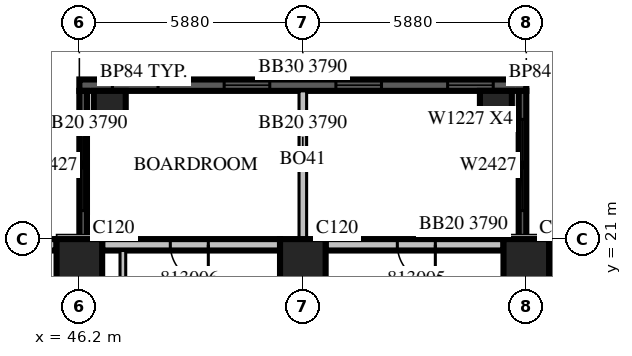
"""IFC4 building model, lengths in metres.
Left out: names, types, materials, properties, quantities, classifications, styles, units other than length and angle.
Written with IfcOpenShell. Run it as: python <this file> out.ifc"""

import sys

from ifc_helpers import new_model, si_unit, direction, frame, frame_2d, origin, origin_2d, place, context, subcontext, project, spatial, rectangle, extrude, source, transform, mapped, element, fill, save


model = new_model("IFC4")
c1 = context("Model", 3, precision=1e-05, world=origin(), true_north=direction((0.0, 1.0)))
c2 = subcontext(c1, "Body", "Model", "MODEL_VIEW")
j1 = project(units=[si_unit("LENGTHUNIT", "METRE"), si_unit("PLANEANGLEUNIT", "RADIAN")], contexts=[c1])
p1 = place(None, origin())
s1 = spatial("IfcSite", under=j1, at=p1, CompositionType="ELEMENT")
p2 = place(p1, origin())
s2 = spatial("IfcBuilding", under=s1, at=p2, CompositionType="ELEMENT")
p3 = place(p2, frame((0.0, 0.0, 65.7)))
s3 = spatial("IfcBuildingStorey", under=s2, at=p3, CompositionType="ELEMENT", Elevation=65.7)
m1 = source(origin(), c2, "Body", "SweptSolid", [
    extrude(rectangle(XDim=1.2, YDim=1.2, at=origin_2d()), origin(), (0.0, 0.0, 1.0), 4.2),
])
for number, where, z_axis, x_axis in (
    (1, (46.2, 20.4, 0.0), (0.0, 0.0, 1.0), (1.0, 0.0, 0.0)),
    (2, (52.08, 20.4, 0.0), (0.0, 0.0, 1.0), (1.0, 0.0, 0.0)),
    (3, (57.96, 20.4, 0.0), (0.0, 0.0, 1.0), (1.0, 0.0, 0.0)),
):
    element("IfcColumn", number, at=place(p3, frame(where, z_axis=z_axis, x_axis=x_axis)), inside=s3, PredefinedType="COLUMN", context=c2, shape_type="MappedRepresentation", body=[
        mapped(m1, transform((0.0, 0.0, 0.0), scale=1.0)),
    ])
m2 = source(origin(), c2, "Body", "SweptSolid", [
    extrude(rectangle(XDim=0.84, YDim=0.84, at=origin_2d()), origin(), (0.0, 0.0, 1.0), 4.2),
])
for number, where, z_axis, x_axis in (
    (4, (47.0, 24.48, 0.0), (0.0, 0.0, 1.0), (1.0, 0.0, 0.0)),
    (5, (57.16, 24.48, 0.0), (0.0, 0.0, 1.0), (1.0, 0.0, 0.0)),
):
    element("IfcColumn", number, at=place(p3, frame(where, z_axis=z_axis, x_axis=x_axis)), inside=s3, PredefinedType="COLUMN", context=c2, shape_type="MappedRepresentation", body=[
        mapped(m2, transform((0.0, 0.0, 0.0), scale=1.0)),
    ])
m3 = source(origin(), c2, "Body", "SweptSolid", [
    extrude(rectangle(XDim=11.76, YDim=0.3, at=frame_2d((5.88, 0.0))), origin(), (0.0, 0.0, 1.0), 3.79),
])
p4 = place(p3, frame((57.96, 25.05, 0.0), z_axis=(0.0, 0.0, 1.0), x_axis=(-1.0, 0.0, 0.0)))
e6 = element("IfcWall", 6, at=p4, inside=s3, PredefinedType="SOLIDWALL", context=c2, shape_type="MappedRepresentation", body=[
    mapped(m3, transform((0.0, 0.0, 0.0), scale=1.0)),
])
m4 = source(origin(), c2, "Body", "SweptSolid", [
    extrude(rectangle(XDim=1.2, YDim=2.7, at=frame_2d((0.6, 1.35))), frame((0.0, 0.16, 0.0), z_axis=(0.0, -1.0, 0.0), x_axis=(1.0, 0.0, 0.0)), (0.0, 0.0, 1.0), 0.32),
])
p5 = place(p4, frame((0.87, 0.0, 0.6)))
e7 = element("IfcOpeningElement", 7, at=p5, cuts=e6, PredefinedType="OPENING", context=c2, shape_type="MappedRepresentation", body=[
    mapped(m4, transform((0.0, 0.0, 0.0), scale=1.0)),
])
p6 = place(p4, frame((3.81, 0.0, 0.6)))
e8 = element("IfcOpeningElement", 8, at=p6, cuts=e6, PredefinedType="OPENING", context=c2, shape_type="MappedRepresentation", body=[
    mapped(m4, transform((0.0, 0.0, 0.0), scale=1.0)),
])
p7 = place(p4, frame((6.75, 0.0, 0.6)))
e9 = element("IfcOpeningElement", 9, at=p7, cuts=e6, PredefinedType="OPENING", context=c2, shape_type="MappedRepresentation", body=[
    mapped(m4, transform((0.0, 0.0, 0.0), scale=1.0)),
])
p8 = place(p4, frame((9.69, 0.0, 0.6)))
e10 = element("IfcOpeningElement", 10, at=p8, cuts=e6, PredefinedType="OPENING", context=c2, shape_type="MappedRepresentation", body=[
    mapped(m4, transform((0.0, 0.0, 0.0), scale=1.0)),
])
m5 = source(origin(), c2, "Body", "SweptSolid", [
    extrude(rectangle(XDim=3.9, YDim=0.2, at=frame_2d((1.95, 0.0))), origin(), (0.0, 0.0, 1.0), 3.79),
])
p9 = place(p3, frame((52.08, 21.0, 0.0), z_axis=(0.0, 0.0, 1.0), x_axis=(0.0, 1.0, 0.0)))
e11 = element("IfcWall", 11, at=p9, inside=s3, PredefinedType="SOLIDWALL", context=c2, shape_type="MappedRepresentation", body=[
    mapped(m5, transform((0.0, 0.0, 0.0), scale=1.0)),
])
m6 = source(origin(), c2, "Body", "SweptSolid", [
    extrude(rectangle(XDim=3.9, YDim=0.2, at=frame_2d((1.95, 0.0))), origin(), (0.0, 0.0, 1.0), 3.79),
])
p10 = place(p3, frame((57.86, 21.0, 0.0), z_axis=(0.0, 0.0, 1.0), x_axis=(0.0, 1.0, 0.0)))
e12 = element("IfcWall", 12, at=p10, inside=s3, PredefinedType="SOLIDWALL", context=c2, shape_type="MappedRepresentation", body=[
    mapped(m6, transform((0.0, 0.0, 0.0), scale=1.0)),
])
m7 = source(origin(), c2, "Body", "SweptSolid", [
    extrude(rectangle(XDim=2.4, YDim=2.7, at=frame_2d((1.2, 1.35))), frame((0.0, 0.11, 0.0), z_axis=(0.0, -1.0, 0.0), x_axis=(1.0, 0.0, 0.0)), (0.0, 0.0, 1.0), 0.22),
])
p11 = place(p10, frame((0.75, 0.0, 0.6)))
e13 = element("IfcOpeningElement", 13, at=p11, cuts=e12, PredefinedType="OPENING", context=c2, shape_type="MappedRepresentation", body=[
    mapped(m7, transform((0.0, 0.0, 0.0), scale=1.0)),
])
p12 = place(p3, frame((46.3, 21.0, 0.0), z_axis=(0.0, 0.0, 1.0), x_axis=(0.0, 1.0, 0.0)))
e14 = element("IfcWall", 14, at=p12, inside=s3, PredefinedType="SOLIDWALL", context=c2, shape_type="MappedRepresentation", body=[
    mapped(m6, transform((0.0, 0.0, 0.0), scale=1.0)),
])
p13 = place(p12, frame((0.75, 0.0, 0.6)))
e15 = element("IfcOpeningElement", 15, at=p13, cuts=e14, PredefinedType="OPENING", context=c2, shape_type="MappedRepresentation", body=[
    mapped(m7, transform((0.0, 0.0, 0.0), scale=1.0)),
])
m8 = source(origin(), c2, "Body", "SweptSolid", [
    extrude(rectangle(XDim=0.24, YDim=0.3, at=frame_2d((0.12, 0.0))), origin(), (0.0, 0.0, 1.0), 3.8),
])
p14 = place(p3, frame((58.8, 20.85, 0.0), z_axis=(0.0, 0.0, 1.0), x_axis=(-1.0, 0.0, 0.0)))
e16 = element("IfcWall", 16, at=p14, inside=s3, PredefinedType="STANDARD", context=c2, shape_type="MappedRepresentation", body=[
    mapped(m8, transform((0.0, 0.0, 0.0), scale=1.0)),
])
m9 = source(origin(), c2, "Body", "SweptSolid", [
    extrude(rectangle(XDim=4.68, YDim=0.3, at=frame_2d((2.34, 0.0))), origin(), (0.0, 0.0, 1.0), 3.8),
])
p15 = place(p3, frame((57.36, 20.85, 0.0), z_axis=(0.0, 0.0, 1.0), x_axis=(-1.0, 0.0, 0.0)))
e17 = element("IfcWall", 17, at=p15, inside=s3, PredefinedType="STANDARD", context=c2, shape_type="MappedRepresentation", body=[
    mapped(m9, transform((0.0, 0.0, 0.0), scale=1.0)),
])
m10 = source(origin(), c2, "Body", "SweptSolid", [
    extrude(rectangle(XDim=1.0, YDim=2.1, at=frame_2d((0.5, 1.05))), frame((0.0, 0.16, 0.0), z_axis=(0.0, -1.0, 0.0), x_axis=(1.0, 0.0, 0.0)), (0.0, 0.0, 1.0), 0.32),
])
p16 = place(p15, frame((1.793, 0.0, 0.0)))
e18 = element("IfcOpeningElement", 18, at=p16, cuts=e17, PredefinedType="OPENING", context=c2, shape_type="MappedRepresentation", body=[
    mapped(m10, transform((0.0, 0.0, 0.0), scale=1.0)),
])
p17 = place(p3, frame((51.48, 20.85, 0.0), z_axis=(0.0, 0.0, 1.0), x_axis=(-1.0, 0.0, 0.0)))
e19 = element("IfcWall", 19, at=p17, inside=s3, PredefinedType="STANDARD", context=c2, shape_type="MappedRepresentation", body=[
    mapped(m9, transform((0.0, 0.0, 0.0), scale=1.0)),
])
p18 = place(p17, frame((1.887, 0.0, 0.0)))
e20 = element("IfcOpeningElement", 20, at=p18, cuts=e19, PredefinedType="OPENING", context=c2, shape_type="MappedRepresentation", body=[
    mapped(m10, transform((0.0, 0.0, 0.0), scale=1.0)),
])
m11 = source(origin(), c2, "Body", "SweptSolid", [
    extrude(rectangle(XDim=7.2, YDim=0.3, at=frame_2d((3.6, 0.0))), origin(), (0.0, 0.0, 1.0), 3.8),
])
p19 = place(p3, frame((45.6, 20.85, 0.0), z_axis=(0.0, 0.0, 1.0), x_axis=(-1.0, 0.0, 0.0)))
e21 = element("IfcWall", 21, at=p19, inside=s3, PredefinedType="STANDARD", context=c2, shape_type="MappedRepresentation", body=[
    mapped(m11, transform((0.0, 0.0, 0.0), scale=1.0)),
])
m12 = source(origin(), c2, "Body", "SweptSolid", [
    extrude(rectangle(XDim=2.4, YDim=2.7, at=frame_2d((1.2, 1.35))), frame((0.0, 0.16, 0.0), z_axis=(0.0, -1.0, 0.0), x_axis=(1.0, 0.0, 0.0)), (0.0, 0.0, 1.0), 0.32),
])
p20 = place(p19, frame((0.3, 0.0, 0.6)))
e22 = element("IfcOpeningElement", 22, at=p20, cuts=e21, PredefinedType="OPENING", context=c2, shape_type="MappedRepresentation", body=[
    mapped(m12, transform((0.0, 0.0, 0.0), scale=1.0)),
])
m13 = source(origin(), c2, "Body", "SweptSolid", [
    extrude(rectangle(XDim=3.6, YDim=0.15, at=frame_2d((1.8, 0.0))), origin(), (0.0, 0.0, 1.0), 3.8),
])
p21 = place(p3, frame((47.345, 20.7, 0.0), z_axis=(0.0, 0.0, 1.0), x_axis=(0.0, -1.0, 0.0)))
e23 = element("IfcWall", 23, at=p21, inside=s3, PredefinedType="PARTITIONING", context=c2, shape_type="MappedRepresentation", body=[
    mapped(m13, transform((0.0, 0.0, 0.0), scale=1.0)),
])
m14 = source(origin(), c2, "Body", "SweptSolid", [
    extrude(rectangle(XDim=1.2, YDim=2.7, at=frame_2d((0.6, 1.35))), frame((0.0, 0.03, 0.0), z_axis=(0.0, -1.0, 0.0), x_axis=(1.0, 0.0, 0.0)), (0.0, 0.0, 1.0), 0.06),
])
p22 = place(p5, origin())
e24 = element("IfcWindow", 24, at=p22, inside=s3, PartitioningType="SINGLE_PANEL", PredefinedType="WINDOW", context=c2, shape_type="MappedRepresentation", body=[
    mapped(m14, transform((0.0, 0.0, 0.0), scale=1.0)),
])
fill(e7, e24)
p23 = place(p6, origin())
e25 = element("IfcWindow", 25, at=p23, inside=s3, PartitioningType="SINGLE_PANEL", PredefinedType="WINDOW", context=c2, shape_type="MappedRepresentation", body=[
    mapped(m14, transform((0.0, 0.0, 0.0), scale=1.0)),
])
fill(e8, e25)
p24 = place(p7, origin())
e26 = element("IfcWindow", 26, at=p24, inside=s3, PartitioningType="SINGLE_PANEL", PredefinedType="WINDOW", context=c2, shape_type="MappedRepresentation", body=[
    mapped(m14, transform((0.0, 0.0, 0.0), scale=1.0)),
])
fill(e9, e26)
p25 = place(p8, origin())
e27 = element("IfcWindow", 27, at=p25, inside=s3, PartitioningType="SINGLE_PANEL", PredefinedType="WINDOW", context=c2, shape_type="MappedRepresentation", body=[
    mapped(m14, transform((0.0, 0.0, 0.0), scale=1.0)),
])
fill(e10, e27)
m15 = source(origin(), c2, "Body", "SweptSolid", [
    extrude(rectangle(XDim=2.4, YDim=2.7, at=frame_2d((1.2, 1.35))), frame((0.0, 0.03, 0.0), z_axis=(0.0, -1.0, 0.0), x_axis=(1.0, 0.0, 0.0)), (0.0, 0.0, 1.0), 0.06),
])
p26 = place(p11, origin())
e28 = element("IfcWindow", 28, at=p26, inside=s3, PartitioningType="SINGLE_PANEL", PredefinedType="WINDOW", context=c2, shape_type="MappedRepresentation", body=[
    mapped(m15, transform((0.0, 0.0, 0.0), scale=1.0)),
])
fill(e13, e28)
p27 = place(p13, origin())
e29 = element("IfcWindow", 29, at=p27, inside=s3, PartitioningType="SINGLE_PANEL", PredefinedType="WINDOW", context=c2, shape_type="MappedRepresentation", body=[
    mapped(m15, transform((0.0, 0.0, 0.0), scale=1.0)),
])
fill(e15, e29)
m16 = source(origin(), c2, "Body", "SweptSolid", [
    extrude(rectangle(XDim=1.0, YDim=2.1, at=frame_2d((0.5, 1.05))), frame((0.0, 0.025, 0.0), z_axis=(0.0, -1.0, 0.0), x_axis=(1.0, 0.0, 0.0)), (0.0, 0.0, 1.0), 0.05),
])
p28 = place(p16, origin())
e30 = element("IfcDoor", 30, at=p28, inside=s3, OperationType="SINGLE_SWING_LEFT", PredefinedType="DOOR", context=c2, shape_type="MappedRepresentation", body=[
    mapped(m16, transform((0.0, 0.0, 0.0), scale=1.0)),
])
fill(e18, e30)
p29 = place(p18, origin())
e31 = element("IfcDoor", 31, at=p29, inside=s3, OperationType="SINGLE_SWING_LEFT", PredefinedType="DOOR", context=c2, shape_type="MappedRepresentation", body=[
    mapped(m16, transform((0.0, 0.0, 0.0), scale=1.0)),
])
fill(e20, e31)
save(model, sys.argv[1])
